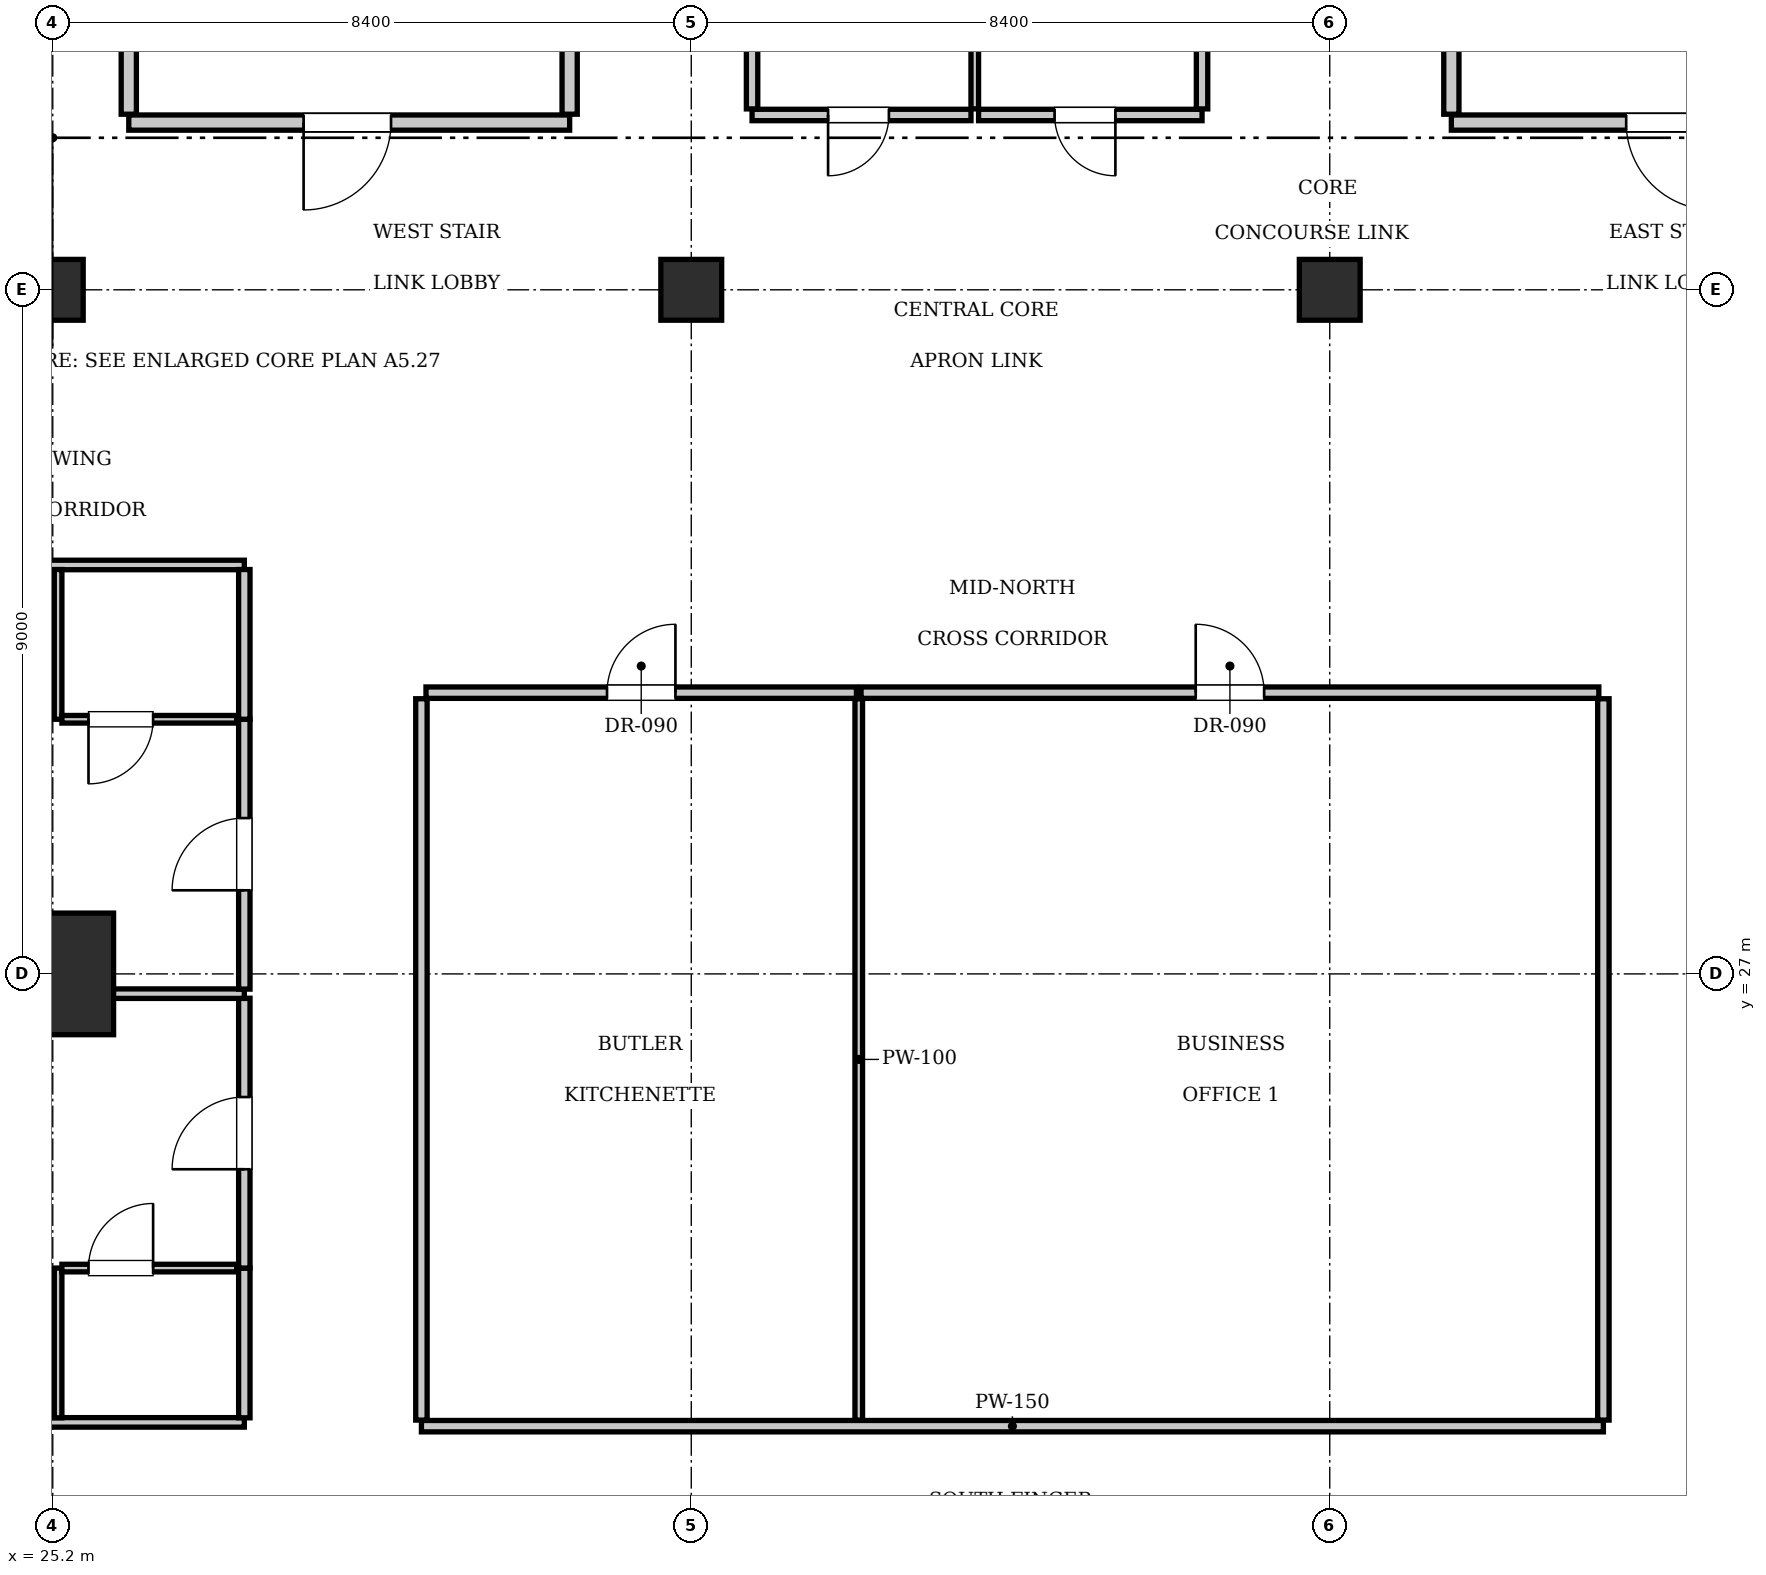
"""IFC4 building model, lengths in metres.
Left out: names, types, materials, properties, quantities, classifications, styles, units other than length and angle.
Written with IfcOpenShell. Run it as: python <this file> out.ifc"""

import sys

from ifc_helpers import new_model, si_unit, direction, frame, frame_2d, origin, origin_2d, place, context, subcontext, project, spatial, rectangle, extrude, element, fill, save


model = new_model("IFC4")
c1 = context("Model", 3, precision=1e-05, world=origin(), true_north=direction((0.0, 1.0)))
c2 = subcontext(c1, "Body", "Model", "MODEL_VIEW")
j1 = project(units=[si_unit("LENGTHUNIT", "METRE"), si_unit("PLANEANGLEUNIT", "RADIAN")], contexts=[c1])
p1 = place(None, origin())
s1 = spatial("IfcSite", under=j1, at=p1, CompositionType="ELEMENT")
p2 = place(p1, origin())
s2 = spatial("IfcBuilding", under=s1, at=p2, CompositionType="ELEMENT")
p3 = place(p2, frame((0.0, 0.0, 243.25)))
s3 = spatial("IfcBuildingStorey", under=s2, at=p3, CompositionType="ELEMENT", Elevation=243.25)
p4 = place(p3, frame((25.2, 27.0, 0.0), z_axis=(0.0, 0.0, 1.0), x_axis=(1.0, 0.0, 0.0)))
e1 = element("IfcColumn", 1, at=p4, inside=s3, PredefinedType="COLUMN", context=c2, shape_type="SweptSolid", body=[
    extrude(rectangle(XDim=1.6, YDim=1.6, at=origin_2d()), origin(), (0.0, 0.0, 1.0), 3.85),
])
for number, where, z_axis, x_axis in (
    (2, (25.2, 36.0, 0.0), (0.0, 0.0, 1.0), (1.0, 0.0, 0.0)),
    (3, (33.6, 36.0, 0.0), (0.0, 0.0, 1.0), (1.0, 0.0, 0.0)),
    (4, (42.0, 36.0, 0.0), (0.0, 0.0, 1.0), (1.0, 0.0, 0.0)),
):
    element("IfcColumn", number, at=place(p3, frame(where, z_axis=z_axis, x_axis=x_axis)), inside=s3, PredefinedType="COLUMN", context=c2, shape_type="SweptSolid", body=[
        extrude(rectangle(XDim=0.8, YDim=0.8, at=origin_2d()), origin(), (0.0, 0.0, 1.0), 3.85),
    ])
p5 = place(p3, frame((26.2, 38.2, 0.0), z_axis=(0.0, 0.0, 1.0), x_axis=(1.0, 0.0, 0.0)))
e5 = element("IfcWall", 5, at=p5, inside=s3, PredefinedType="PARTITIONING", context=c2, shape_type="SweptSolid", body=[
    extrude(rectangle(XDim=5.8, YDim=0.2, at=frame_2d((2.9, 0.0))), origin(), (0.0, 0.0, 1.0), 3.61),
])
p6 = place(p5, frame((2.3, 0.0, 0.0)))
e6 = element("IfcOpeningElement", 6, at=p6, cuts=e5, PredefinedType="OPENING", context=c2, shape_type="SweptSolid", body=[
    extrude(rectangle(XDim=1.15, YDim=2.15, at=frame_2d((0.575, 1.075))), frame((0.0, 0.11, 0.0), z_axis=(0.0, -1.0, 0.0), x_axis=(1.0, 0.0, 0.0)), (0.0, 0.0, 1.0), 0.22),
])
for number, where, z_axis, x_axis in (
    (7, (26.2, 38.31, 0.0), (0.0, 0.0, 1.0), (0.0, 1.0, 0.0)),
    (8, (32.0, 38.31, 0.0), (0.0, 0.0, 1.0), (0.0, 1.0, 0.0)),
):
    element("IfcWall", number, at=place(p3, frame(where, z_axis=z_axis, x_axis=x_axis)), inside=s3, PredefinedType="PARTITIONING", context=c2, shape_type="SweptSolid", body=[
        extrude(rectangle(XDim=3.07, YDim=0.2, at=frame_2d((1.535, 0.0))), origin(), (0.0, 0.0, 1.0), 3.61),
    ])
p7 = place(p3, frame((43.6, 38.2, 0.0), z_axis=(0.0, 0.0, 1.0), x_axis=(1.0, 0.0, 0.0)))
e9 = element("IfcWall", 9, at=p7, inside=s3, PredefinedType="PARTITIONING", context=c2, shape_type="SweptSolid", body=[
    extrude(rectangle(XDim=5.8, YDim=0.2, at=frame_2d((2.9, 0.0))), origin(), (0.0, 0.0, 1.0), 3.61),
])
p8 = place(p7, frame((2.3, 0.0, 0.0)))
e10 = element("IfcOpeningElement", 10, at=p8, cuts=e9, PredefinedType="OPENING", context=c2, shape_type="SweptSolid", body=[
    extrude(rectangle(XDim=1.15, YDim=2.15, at=frame_2d((0.575, 1.075))), frame((0.0, 0.11, 0.0), z_axis=(0.0, -1.0, 0.0), x_axis=(1.0, 0.0, 0.0)), (0.0, 0.0, 1.0), 0.22),
])
p9 = place(p3, frame((43.6, 38.31, 0.0), z_axis=(0.0, 0.0, 1.0), x_axis=(0.0, 1.0, 0.0)))
e11 = element("IfcWall", 11, at=p9, inside=s3, PredefinedType="PARTITIONING", context=c2, shape_type="SweptSolid", body=[
    extrude(rectangle(XDim=3.07, YDim=0.2, at=frame_2d((1.535, 0.0))), origin(), (0.0, 0.0, 1.0), 3.61),
])
p10 = place(p3, frame((34.4, 38.3, 0.0), z_axis=(0.0, 0.0, 1.0), x_axis=(1.0, 0.0, 0.0)))
e12 = element("IfcWall", 12, at=p10, inside=s3, PredefinedType="PARTITIONING", context=c2, shape_type="SweptSolid", body=[
    extrude(rectangle(XDim=2.88, YDim=0.15, at=frame_2d((1.44, 0.0))), origin(), (0.0, 0.0, 1.0), 3.61),
])
p11 = place(p10, frame((1.0, 0.0, 0.0)))
e13 = element("IfcOpeningElement", 13, at=p11, cuts=e12, PredefinedType="OPENING", context=c2, shape_type="SweptSolid", body=[
    extrude(rectangle(XDim=0.8, YDim=2.05, at=frame_2d((0.4, 1.025))), frame((0.0, 0.085, 0.0), z_axis=(0.0, -1.0, 0.0), x_axis=(1.0, 0.0, 0.0)), (0.0, 0.0, 1.0), 0.17),
])
p12 = place(p3, frame((37.38, 38.3, 0.0), z_axis=(0.0, 0.0, 1.0), x_axis=(1.0, 0.0, 0.0)))
e14 = element("IfcWall", 14, at=p12, inside=s3, PredefinedType="PARTITIONING", context=c2, shape_type="SweptSolid", body=[
    extrude(rectangle(XDim=2.94, YDim=0.15, at=frame_2d((1.47, 0.0))), origin(), (0.0, 0.0, 1.0), 3.61),
])
p13 = place(p12, frame((1.0, 0.0, 0.0)))
e15 = element("IfcOpeningElement", 15, at=p13, cuts=e14, PredefinedType="OPENING", context=c2, shape_type="SweptSolid", body=[
    extrude(rectangle(XDim=0.8, YDim=2.05, at=frame_2d((0.4, 1.025))), frame((0.0, 0.085, 0.0), z_axis=(0.0, -1.0, 0.0), x_axis=(1.0, 0.0, 0.0)), (0.0, 0.0, 1.0), 0.17),
])
p14 = place(p3, frame((34.4, 38.38, 0.0), z_axis=(0.0, 0.0, 1.0), x_axis=(0.0, 1.0, 0.0)))
e16 = element("IfcWall", 16, at=p14, inside=s3, PredefinedType="PARTITIONING", context=c2, shape_type="SweptSolid", body=[
    extrude(rectangle(XDim=2.84, YDim=0.15, at=frame_2d((1.42, 0.0))), origin(), (0.0, 0.0, 1.0), 3.61),
])
p15 = place(p3, frame((37.33, 38.38, 0.0), z_axis=(0.0, 0.0, 1.0), x_axis=(0.0, 1.0, 0.0)))
e17 = element("IfcWall", 17, at=p15, inside=s3, PredefinedType="PARTITIONING", context=c2, shape_type="SweptSolid", body=[
    extrude(rectangle(XDim=2.84, YDim=0.1, at=frame_2d((1.42, 0.0))), origin(), (0.0, 0.0, 1.0), 3.61),
])
p16 = place(p3, frame((40.32, 38.38, 0.0), z_axis=(0.0, 0.0, 1.0), x_axis=(0.0, 1.0, 0.0)))
e18 = element("IfcWall", 18, at=p16, inside=s3, PredefinedType="PARTITIONING", context=c2, shape_type="SweptSolid", body=[
    extrude(rectangle(XDim=2.84, YDim=0.15, at=frame_2d((1.42, 0.0))), origin(), (0.0, 0.0, 1.0), 3.61),
])
p17 = place(p3, frame((30.05, 21.05, 0.0), z_axis=(0.0, 0.0, 1.0), x_axis=(1.0, 0.0, 0.0)))
e19 = element("IfcWall", 19, at=p17, inside=s3, PredefinedType="PARTITIONING", context=c2, shape_type="SweptSolid", body=[
    extrude(rectangle(XDim=15.55, YDim=0.15, at=frame_2d((7.775, 0.0))), origin(), (0.0, 0.0, 1.0), 3.61),
])
for number, where, z_axis, x_axis in (
    (20, (30.05, 21.13, 0.0), (0.0, 0.0, 1.0), (0.0, 1.0, 0.0)),
    (21, (45.6, 21.13, 0.0), (0.0, 0.0, 1.0), (0.0, 1.0, 0.0)),
):
    element("IfcWall", number, at=place(p3, frame(where, z_axis=z_axis, x_axis=x_axis)), inside=s3, PredefinedType="PARTITIONING", context=c2, shape_type="SweptSolid", body=[
        extrude(rectangle(XDim=9.49, YDim=0.15, at=frame_2d((4.745, 0.0))), origin(), (0.0, 0.0, 1.0), 3.61),
    ])
p18 = place(p3, frame((30.11, 30.7, 0.0), z_axis=(0.0, 0.0, 1.0), x_axis=(1.0, 0.0, 0.0)))
e22 = element("IfcWall", 22, at=p18, inside=s3, PredefinedType="PARTITIONING", context=c2, shape_type="SweptSolid", body=[
    extrude(rectangle(XDim=5.663, YDim=0.15, at=frame_2d((2.832, 0.0))), origin(), (0.0, 0.0, 1.0), 3.61),
])
p19 = place(p18, frame((2.382, 0.0, 0.0)))
e23 = element("IfcOpeningElement", 23, at=p19, cuts=e22, PredefinedType="OPENING", context=c2, shape_type="SweptSolid", body=[
    extrude(rectangle(XDim=0.9, YDim=2.1, at=frame_2d((0.45, 1.05))), frame((0.0, 0.085, 0.0), z_axis=(0.0, -1.0, 0.0), x_axis=(1.0, 0.0, 0.0)), (0.0, 0.0, 1.0), 0.17),
])
p20 = place(p3, frame((35.803, 21.13, 0.0), z_axis=(0.0, 0.0, 1.0), x_axis=(0.0, 1.0, 0.0)))
e24 = element("IfcWall", 24, at=p20, inside=s3, PredefinedType="PARTITIONING", context=c2, shape_type="SweptSolid", body=[
    extrude(rectangle(XDim=9.49, YDim=0.1, at=frame_2d((4.745, 0.0))), origin(), (0.0, 0.0, 1.0), 3.61),
])
p21 = place(p3, frame((35.833, 30.7, 0.0), z_axis=(0.0, 0.0, 1.0), x_axis=(1.0, 0.0, 0.0)))
e25 = element("IfcWall", 25, at=p21, inside=s3, PredefinedType="PARTITIONING", context=c2, shape_type="SweptSolid", body=[
    extrude(rectangle(XDim=9.707, YDim=0.15, at=frame_2d((4.853, 0.0))), origin(), (0.0, 0.0, 1.0), 3.61),
])
p22 = place(p21, frame((4.403, 0.0, 0.0)))
e26 = element("IfcOpeningElement", 26, at=p22, cuts=e25, PredefinedType="OPENING", context=c2, shape_type="SweptSolid", body=[
    extrude(rectangle(XDim=0.9, YDim=2.1, at=frame_2d((0.45, 1.05))), frame((0.0, 0.085, 0.0), z_axis=(0.0, -1.0, 0.0), x_axis=(1.0, 0.0, 0.0)), (0.0, 0.0, 1.0), 0.17),
])
for number, where, z_axis, x_axis in (
    (27, (15.5, 21.1, 0.0), (0.0, 0.0, 1.0), (1.0, 0.0, 0.0)),
    (28, (15.5, 32.38, 0.0), (0.0, 0.0, 1.0), (1.0, 0.0, 0.0)),
):
    element("IfcWall", number, at=place(p3, frame(where, z_axis=z_axis, x_axis=x_axis)), inside=s3, PredefinedType="PARTITIONING", context=c2, shape_type="SweptSolid", body=[
        extrude(rectangle(XDim=12.22, YDim=0.125, at=frame_2d((6.11, 0.0))), origin(), (0.0, 0.0, 1.0), 3.61),
    ])
p23 = place(p3, frame((27.72, 21.16, 0.0), z_axis=(0.0, 0.0, 1.0), x_axis=(0.0, 1.0, 0.0)))
e29 = element("IfcWall", 29, at=p23, inside=s3, PredefinedType="PARTITIONING", context=c2, shape_type="SweptSolid", body=[
    extrude(rectangle(XDim=1.97, YDim=0.15, at=frame_2d((0.985, 0.0))), origin(), (0.0, 0.0, 1.0), 3.61),
])
p24 = place(p3, frame((27.72, 23.13, 0.0), z_axis=(0.0, 0.0, 1.0), x_axis=(0.0, 1.0, 0.0)))
e30 = element("IfcWall", 30, at=p24, inside=s3, PredefinedType="PARTITIONING", context=c2, shape_type="SweptSolid", body=[
    extrude(rectangle(XDim=3.55, YDim=0.15, at=frame_2d((1.775, 0.0))), origin(), (0.0, 0.0, 1.0), 3.61),
])
p25 = place(p24, frame((1.3, 0.0, 0.0)))
e31 = element("IfcOpeningElement", 31, at=p25, cuts=e30, PredefinedType="OPENING", context=c2, shape_type="SweptSolid", body=[
    extrude(rectangle(XDim=0.95, YDim=2.15, at=frame_2d((0.475, 1.075))), frame((0.0, 0.085, 0.0), z_axis=(0.0, -1.0, 0.0), x_axis=(1.0, 0.0, 0.0)), (0.0, 0.0, 1.0), 0.17),
])
p26 = place(p3, frame((25.27, 21.16, 0.0), z_axis=(0.0, 0.0, 1.0), x_axis=(0.0, 1.0, 0.0)))
e32 = element("IfcWall", 32, at=p26, inside=s3, PredefinedType="PARTITIONING", context=c2, shape_type="SweptSolid", body=[
    extrude(rectangle(XDim=1.97, YDim=0.1, at=frame_2d((0.985, 0.0))), origin(), (0.0, 0.0, 1.0), 3.077),
])
p27 = place(p3, frame((25.32, 23.13, 0.0), z_axis=(0.0, 0.0, 1.0), x_axis=(1.0, 0.0, 0.0)))
e33 = element("IfcWall", 33, at=p27, inside=s3, PredefinedType="PARTITIONING", context=c2, shape_type="SweptSolid", body=[
    extrude(rectangle(XDim=2.3, YDim=0.1, at=frame_2d((1.15, 0.0))), origin(), (0.0, 0.0, 1.0), 3.61),
])
p28 = place(p27, frame((0.35, 0.0, 0.0)))
e34 = element("IfcOpeningElement", 34, at=p28, cuts=e33, PredefinedType="OPENING", context=c2, shape_type="SweptSolid", body=[
    extrude(rectangle(XDim=0.85, YDim=2.1, at=frame_2d((0.425, 1.05))), frame((0.0, 0.06, 0.0), z_axis=(0.0, -1.0, 0.0), x_axis=(1.0, 0.0, 0.0)), (0.0, 0.0, 1.0), 0.12),
])
p29 = place(p3, frame((15.5, 26.74, 0.0), z_axis=(0.0, 0.0, 1.0), x_axis=(1.0, 0.0, 0.0)))
e35 = element("IfcWall", 35, at=p29, inside=s3, PredefinedType="PARTITIONING", context=c2, shape_type="SweptSolid", body=[
    extrude(rectangle(XDim=12.22, YDim=0.125, at=frame_2d((6.11, 0.0))), origin(), (0.0, 0.0, 1.0), 2.41),
])
p30 = place(p3, frame((27.72, 26.8, 0.0), z_axis=(0.0, 0.0, 1.0), x_axis=(0.0, 1.0, 0.0)))
e36 = element("IfcWall", 36, at=p30, inside=s3, PredefinedType="PARTITIONING", context=c2, shape_type="SweptSolid", body=[
    extrude(rectangle(XDim=3.55, YDim=0.15, at=frame_2d((1.775, 0.0))), origin(), (0.0, 0.0, 1.0), 3.61),
])
p31 = place(p30, frame((1.3, 0.0, 0.0)))
e37 = element("IfcOpeningElement", 37, at=p31, cuts=e36, PredefinedType="OPENING", context=c2, shape_type="SweptSolid", body=[
    extrude(rectangle(XDim=0.95, YDim=2.15, at=frame_2d((0.475, 1.075))), frame((0.0, 0.085, 0.0), z_axis=(0.0, -1.0, 0.0), x_axis=(1.0, 0.0, 0.0)), (0.0, 0.0, 1.0), 0.17),
])
p32 = place(p3, frame((27.72, 30.35, 0.0), z_axis=(0.0, 0.0, 1.0), x_axis=(0.0, 1.0, 0.0)))
e38 = element("IfcWall", 38, at=p32, inside=s3, PredefinedType="PARTITIONING", context=c2, shape_type="SweptSolid", body=[
    extrude(rectangle(XDim=1.97, YDim=0.15, at=frame_2d((0.985, 0.0))), origin(), (0.0, 0.0, 1.0), 3.61),
])
p33 = place(p3, frame((25.27, 30.35, 0.0), z_axis=(0.0, 0.0, 1.0), x_axis=(0.0, 1.0, 0.0)))
e39 = element("IfcWall", 39, at=p33, inside=s3, PredefinedType="PARTITIONING", context=c2, shape_type="SweptSolid", body=[
    extrude(rectangle(XDim=1.97, YDim=0.1, at=frame_2d((0.985, 0.0))), origin(), (0.0, 0.0, 1.0), 3.077),
])
p34 = place(p3, frame((25.32, 30.35, 0.0), z_axis=(0.0, 0.0, 1.0), x_axis=(1.0, 0.0, 0.0)))
e40 = element("IfcWall", 40, at=p34, inside=s3, PredefinedType="PARTITIONING", context=c2, shape_type="SweptSolid", body=[
    extrude(rectangle(XDim=2.3, YDim=0.1, at=frame_2d((1.15, 0.0))), origin(), (0.0, 0.0, 1.0), 3.61),
])
p35 = place(p34, frame((0.35, 0.0, 0.0)))
e41 = element("IfcOpeningElement", 41, at=p35, cuts=e40, PredefinedType="OPENING", context=c2, shape_type="SweptSolid", body=[
    extrude(rectangle(XDim=0.85, YDim=2.1, at=frame_2d((0.425, 1.05))), frame((0.0, 0.06, 0.0), z_axis=(0.0, -1.0, 0.0), x_axis=(1.0, 0.0, 0.0)), (0.0, 0.0, 1.0), 0.12),
])
p36 = place(p6, frame((1.15, 0.0, 0.0), z_axis=(0.0, 0.0, 1.0), x_axis=(-1.0, 0.0, 0.0)))
e42 = element("IfcDoor", 42, at=p36, inside=s3, OperationType="SINGLE_SWING_RIGHT", PredefinedType="DOOR", context=c2, shape_type="SweptSolid", body=[
    extrude(rectangle(XDim=1.15, YDim=2.15, at=frame_2d((0.575, 1.075))), frame((0.0, 0.025, 0.0), z_axis=(0.0, -1.0, 0.0), x_axis=(1.0, 0.0, 0.0)), (0.0, 0.0, 1.0), 0.05),
])
fill(e6, e42)
p37 = place(p8, frame((1.15, 0.0, 0.0), z_axis=(0.0, 0.0, 1.0), x_axis=(-1.0, 0.0, 0.0)))
e43 = element("IfcDoor", 43, at=p37, inside=s3, OperationType="SINGLE_SWING_LEFT", PredefinedType="DOOR", context=c2, shape_type="SweptSolid", body=[
    extrude(rectangle(XDim=1.15, YDim=2.15, at=frame_2d((0.575, 1.075))), frame((0.0, 0.025, 0.0), z_axis=(0.0, -1.0, 0.0), x_axis=(1.0, 0.0, 0.0)), (0.0, 0.0, 1.0), 0.05),
])
fill(e10, e43)
p38 = place(p11, frame((0.8, 0.0, 0.0), z_axis=(0.0, 0.0, 1.0), x_axis=(-1.0, 0.0, 0.0)))
e44 = element("IfcDoor", 44, at=p38, inside=s3, OperationType="SINGLE_SWING_RIGHT", PredefinedType="DOOR", context=c2, shape_type="SweptSolid", body=[
    extrude(rectangle(XDim=0.8, YDim=2.05, at=frame_2d((0.4, 1.025))), frame((0.0, 0.025, 0.0), z_axis=(0.0, -1.0, 0.0), x_axis=(1.0, 0.0, 0.0)), (0.0, 0.0, 1.0), 0.05),
])
fill(e13, e44)
p39 = place(p13, frame((0.8, 0.0, 0.0), z_axis=(0.0, 0.0, 1.0), x_axis=(-1.0, 0.0, 0.0)))
e45 = element("IfcDoor", 45, at=p39, inside=s3, OperationType="SINGLE_SWING_LEFT", PredefinedType="DOOR", context=c2, shape_type="SweptSolid", body=[
    extrude(rectangle(XDim=0.8, YDim=2.05, at=frame_2d((0.4, 1.025))), frame((0.0, 0.025, 0.0), z_axis=(0.0, -1.0, 0.0), x_axis=(1.0, 0.0, 0.0)), (0.0, 0.0, 1.0), 0.05),
])
fill(e15, e45)
p40 = place(p19, origin())
e46 = element("IfcDoor", 46, at=p40, inside=s3, OperationType="SINGLE_SWING_RIGHT", PredefinedType="DOOR", context=c2, shape_type="SweptSolid", body=[
    extrude(rectangle(XDim=0.9, YDim=2.1, at=frame_2d((0.45, 1.05))), frame((0.0, 0.025, 0.0), z_axis=(0.0, -1.0, 0.0), x_axis=(1.0, 0.0, 0.0)), (0.0, 0.0, 1.0), 0.05),
])
fill(e23, e46)
p41 = place(p22, origin())
e47 = element("IfcDoor", 47, at=p41, inside=s3, OperationType="SINGLE_SWING_LEFT", PredefinedType="DOOR", context=c2, shape_type="SweptSolid", body=[
    extrude(rectangle(XDim=0.9, YDim=2.1, at=frame_2d((0.45, 1.05))), frame((0.0, 0.025, 0.0), z_axis=(0.0, -1.0, 0.0), x_axis=(1.0, 0.0, 0.0)), (0.0, 0.0, 1.0), 0.05),
])
fill(e26, e47)
p42 = place(p28, origin())
e48 = element("IfcDoor", 48, at=p42, inside=s3, OperationType="SINGLE_SWING_RIGHT", PredefinedType="DOOR", context=c2, shape_type="SweptSolid", body=[
    extrude(rectangle(XDim=0.85, YDim=2.1, at=frame_2d((0.425, 1.05))), frame((0.0, 0.025, 0.0), z_axis=(0.0, -1.0, 0.0), x_axis=(1.0, 0.0, 0.0)), (0.0, 0.0, 1.0), 0.05),
])
fill(e34, e48)
p43 = place(p25, origin())
e49 = element("IfcDoor", 49, at=p43, inside=s3, OperationType="SINGLE_SWING_LEFT", PredefinedType="DOOR", context=c2, shape_type="SweptSolid", body=[
    extrude(rectangle(XDim=0.95, YDim=2.15, at=frame_2d((0.475, 1.075))), frame((0.0, 0.025, 0.0), z_axis=(0.0, -1.0, 0.0), x_axis=(1.0, 0.0, 0.0)), (0.0, 0.0, 1.0), 0.05),
])
fill(e31, e49)
p44 = place(p35, frame((0.85, 0.0, 0.0), z_axis=(0.0, 0.0, 1.0), x_axis=(-1.0, 0.0, 0.0)))
e50 = element("IfcDoor", 50, at=p44, inside=s3, OperationType="SINGLE_SWING_RIGHT", PredefinedType="DOOR", context=c2, shape_type="SweptSolid", body=[
    extrude(rectangle(XDim=0.85, YDim=2.1, at=frame_2d((0.425, 1.05))), frame((0.0, 0.025, 0.0), z_axis=(0.0, -1.0, 0.0), x_axis=(1.0, 0.0, 0.0)), (0.0, 0.0, 1.0), 0.05),
])
fill(e41, e50)
p45 = place(p31, origin())
e51 = element("IfcDoor", 51, at=p45, inside=s3, OperationType="SINGLE_SWING_LEFT", PredefinedType="DOOR", context=c2, shape_type="SweptSolid", body=[
    extrude(rectangle(XDim=0.95, YDim=2.15, at=frame_2d((0.475, 1.075))), frame((0.0, 0.025, 0.0), z_axis=(0.0, -1.0, 0.0), x_axis=(1.0, 0.0, 0.0)), (0.0, 0.0, 1.0), 0.05),
])
fill(e37, e51)
save(model, sys.argv[1])
